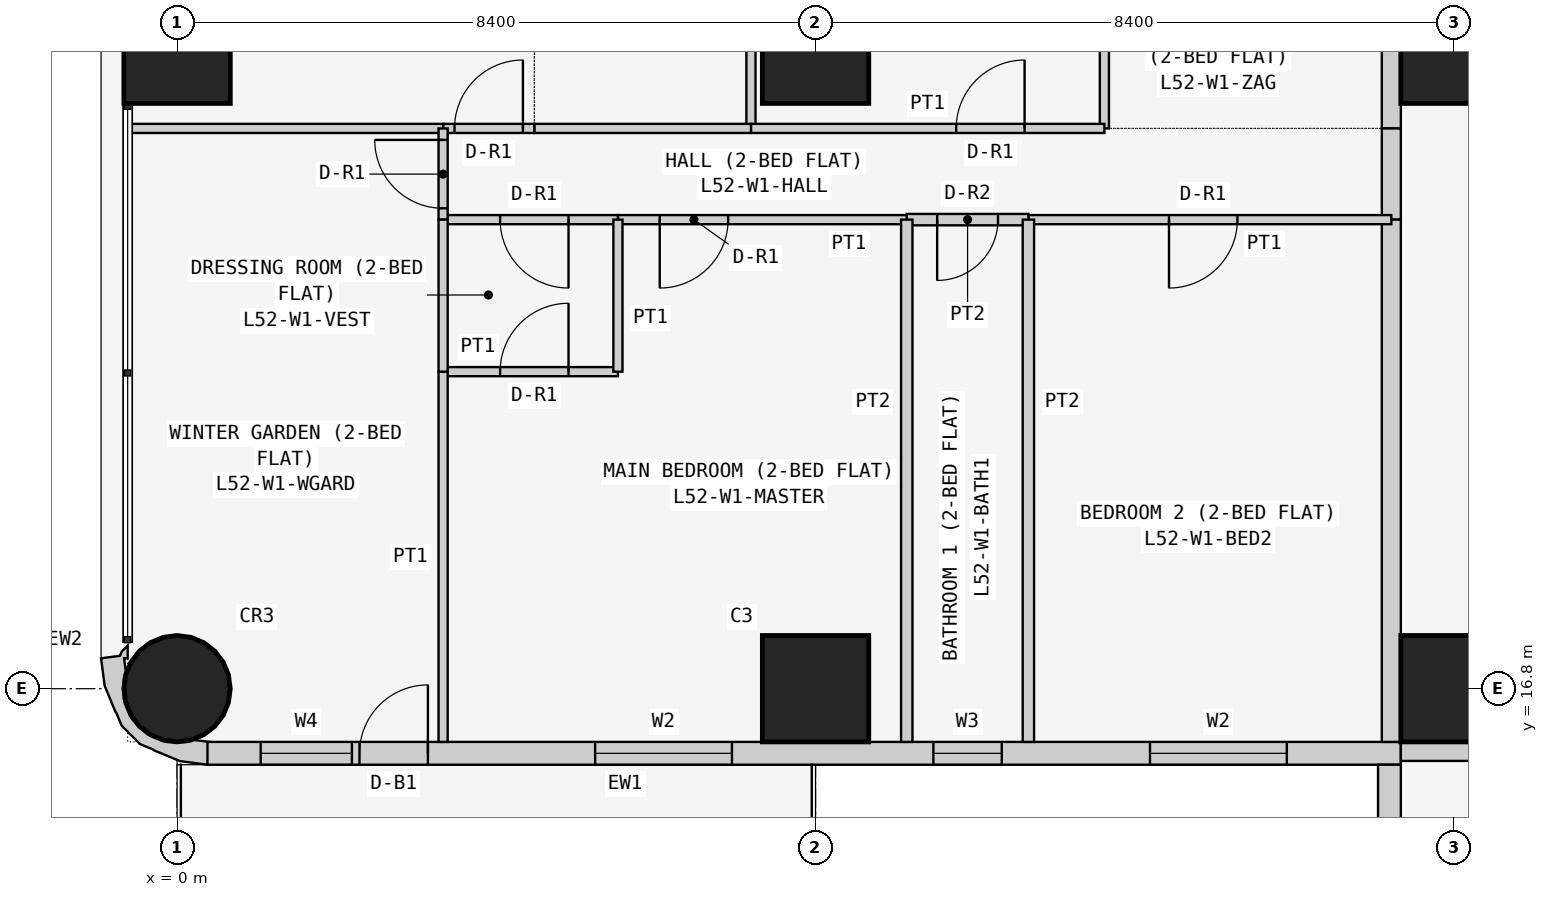
"""IFC4 building model, lengths in metres.
Left out: names, types, materials, properties, quantities, classifications, styles, units other than length and angle.
Written with IfcOpenShell. Run it as: python <this file> out.ifc"""

import sys

from ifc_helpers import new_model, si_unit, direction, frame, frame_2d, origin, origin_2d, place, context, subcontext, project, spatial, polyline, rectangle, circle, outline, extrude, element, fill, save


model = new_model("IFC4")
c1 = context("Model", 3, precision=1e-05, world=origin(), true_north=direction((0.0, 1.0)))
c2 = subcontext(c1, "Body", "Model", "MODEL_VIEW")
j1 = project(units=[si_unit("LENGTHUNIT", "METRE"), si_unit("PLANEANGLEUNIT", "RADIAN")], contexts=[c1])
p1 = place(None, origin())
s1 = spatial("IfcSite", under=j1, at=p1, CompositionType="ELEMENT")
p2 = place(p1, origin())
s2 = spatial("IfcBuilding", under=s1, at=p2, CompositionType="ELEMENT")
p3 = place(p2, frame((0.0, 0.0, 201.3)))
s3 = spatial("IfcBuildingStorey", under=s2, at=p3, CompositionType="ELEMENT", Elevation=201.3)
p4 = place(p3, frame((0.0, 16.8, 0.0), z_axis=(0.0, 0.0, 1.0), x_axis=(1.0, 0.0, 0.0)))
e1 = element("IfcColumn", 1, at=p4, inside=s3, PredefinedType="COLUMN", context=c2, shape_type="SweptSolid", body=[
    extrude(circle(Radius=0.7, at=origin_2d()), origin(), (0.0, 0.0, 1.0), 3.6),
])
for number, where, z_axis, x_axis in (
    (2, (0.0, 25.2, 0.0), (0.0, 0.0, 1.0), (1.0, 0.0, 0.0)),
    (3, (8.4, 16.8, 0.0), (0.0, 0.0, 1.0), (1.0, 0.0, 0.0)),
    (4, (8.4, 25.2, 0.0), (0.0, 0.0, 1.0), (1.0, 0.0, 0.0)),
    (5, (16.8, 16.8, 0.0), (0.0, 0.0, 1.0), (1.0, 0.0, 0.0)),
    (6, (16.8, 25.2, 0.0), (0.0, 0.0, 1.0), (1.0, 0.0, 0.0)),
):
    element("IfcColumn", number, at=place(p3, frame(where, z_axis=z_axis, x_axis=x_axis)), inside=s3, PredefinedType="COLUMN", context=c2, shape_type="SweptSolid", body=[
        extrude(rectangle(XDim=1.4, YDim=1.4, at=origin_2d()), origin(), (0.0, 0.0, 1.0), 3.6),
    ])
p5 = place(p3, frame((0.4, 15.95, 0.0), z_axis=(0.0, 0.0, 1.0), x_axis=(1.0, 0.0, 0.0)))
e7 = element("IfcWall", 7, at=p5, inside=s3, PredefinedType="SOLIDWALL", context=c2, shape_type="SweptSolid", body=[
    extrude(rectangle(XDim=15.7, YDim=0.3, at=frame_2d((7.85, 0.0))), origin(), (0.0, 0.0, 1.0), 3.45),
])
p6 = place(p5, frame((12.4, 0.0, 0.9)))
e8 = element("IfcOpeningElement", 8, at=p6, cuts=e7, PredefinedType="OPENING", context=c2, shape_type="SweptSolid", body=[
    extrude(rectangle(XDim=1.8, YDim=1.5, at=frame_2d((0.9, 0.75))), frame((0.0, 0.16, 0.0), z_axis=(0.0, -1.0, 0.0), x_axis=(1.0, 0.0, 0.0)), (0.0, 0.0, 1.0), 0.32),
])
p7 = place(p5, frame((9.55, 0.0, 1.5)))
e9 = element("IfcOpeningElement", 9, at=p7, cuts=e7, PredefinedType="OPENING", context=c2, shape_type="SweptSolid", body=[
    extrude(rectangle(XDim=0.9, YDim=0.7, at=frame_2d((0.45, 0.35))), frame((0.0, 0.16, 0.0), z_axis=(0.0, -1.0, 0.0), x_axis=(1.0, 0.0, 0.0)), (0.0, 0.0, 1.0), 0.32),
])
p8 = place(p5, frame((5.1, 0.0, 0.9)))
e10 = element("IfcOpeningElement", 10, at=p8, cuts=e7, PredefinedType="OPENING", context=c2, shape_type="SweptSolid", body=[
    extrude(rectangle(XDim=1.8, YDim=1.5, at=frame_2d((0.9, 0.75))), frame((0.0, 0.16, 0.0), z_axis=(0.0, -1.0, 0.0), x_axis=(1.0, 0.0, 0.0)), (0.0, 0.0, 1.0), 0.32),
])
p9 = place(p5, frame((2.0, 0.0, 0.0)))
e11 = element("IfcOpeningElement", 11, at=p9, cuts=e7, PredefinedType="OPENING", context=c2, shape_type="SweptSolid", body=[
    extrude(rectangle(XDim=0.9, YDim=2.4, at=frame_2d((0.45, 1.2))), frame((0.0, 0.16, 0.0), z_axis=(0.0, -1.0, 0.0), x_axis=(1.0, 0.0, 0.0)), (0.0, 0.0, 1.0), 0.32),
])
p10 = place(p5, frame((0.7, 0.0, 0.9)))
e12 = element("IfcOpeningElement", 12, at=p10, cuts=e7, PredefinedType="OPENING", context=c2, shape_type="SweptSolid", body=[
    extrude(rectangle(XDim=1.2, YDim=1.5, at=frame_2d((0.6, 0.75))), frame((0.0, 0.16, 0.0), z_axis=(0.0, -1.0, 0.0), x_axis=(1.0, 0.0, 0.0)), (0.0, 0.0, 1.0), 0.32),
])
p11 = place(p3, frame((15.95, 15.8, 0.0), z_axis=(0.0, 0.0, 1.0), x_axis=(0.0, -1.0, 0.0)))
e13 = element("IfcWall", 13, at=p11, inside=s3, PredefinedType="SOLIDWALL", context=c2, shape_type="SweptSolid", body=[
    extrude(rectangle(XDim=7.0, YDim=0.3, at=frame_2d((3.5, 0.0))), origin(), (0.0, 0.0, 1.0), 3.45),
])
p12 = place(p11, frame((1.5, 0.0, 0.9)))
e14 = element("IfcOpeningElement", 14, at=p12, cuts=e13, PredefinedType="OPENING", context=c2, shape_type="SweptSolid", body=[
    extrude(rectangle(XDim=2.4, YDim=1.5, at=frame_2d((1.2, 0.75))), frame((0.0, 0.16, 0.0), z_axis=(0.0, -1.0, 0.0), x_axis=(1.0, 0.0, 0.0)), (0.0, 0.0, 1.0), 0.32),
])
p13 = place(p11, frame((5.05, 0.0, 0.9)))
e15 = element("IfcOpeningElement", 15, at=p13, cuts=e13, PredefinedType="OPENING", context=c2, shape_type="SweptSolid", body=[
    extrude(rectangle(XDim=1.2, YDim=1.5, at=frame_2d((0.6, 0.75))), frame((0.0, 0.16, 0.0), z_axis=(0.0, -1.0, 0.0), x_axis=(1.0, 0.0, 0.0)), (0.0, 0.0, 1.0), 0.32),
])
p14 = place(p3, frame((-0.588, 17.312, 0.0), z_axis=(0.0, 0.0, 1.0), x_axis=(-0.898030234854, -0.439933741929, 0.0)))
e16 = element("IfcWall", 16, at=p14, inside=s3, PredefinedType="SOLIDWALL", context=c2, shape_type="SweptSolid", body=[
    extrude(outline(polyline([(-0.222, 1.793), (-0.39, 1.541), (-0.372, 1.532), (-0.195, 1.415), (-0.12, 1.41), (0.131, 1.287), (0.315, 1.078), (0.406, 0.814), (0.388, 0.536), (0.265, 0.285), (0.209, 0.236), (0.148, 0.053), (0.105, 0.074), (0.032, -0.076), (0.138, -0.039), (0.182, -0.0), (0.419, -0.08), (0.536, 0.266), (0.559, 0.631), (0.555, 0.651), (0.566, 0.836), (0.456, 1.159), (0.333, 1.298), (0.324, 1.316), (0.082, 1.591), (-0.222, 1.793)])), origin(), (0.0, 0.0, 1.0), 3.45),
])
p15 = place(p3, frame((22.971, 15.975, 0.0), z_axis=(0.0, 0.0, 1.0), x_axis=(-1.0, 0.0, 0.0)))
e17 = element("IfcWall", 17, at=p15, inside=s3, PredefinedType="PARTITIONING", context=c2, shape_type="SweptSolid", body=[
    extrude(rectangle(XDim=6.871, YDim=0.25, at=frame_2d((3.436, 0.0))), origin(), (0.0, 0.0, 1.0), 3.45),
])
p16 = place(p3, frame((15.975, 24.171, 0.0), z_axis=(0.0, 0.0, 1.0), x_axis=(0.0, 1.0, 0.0)))
e18 = element("IfcWall", 18, at=p16, inside=s3, PredefinedType="PARTITIONING", context=c2, shape_type="SweptSolid", body=[
    extrude(rectangle(XDim=5.229, YDim=0.25, at=frame_2d((2.615, 0.0))), origin(), (0.0, 0.0, 1.0), 3.45),
])
p17 = place(p16, frame((2.129, 0.0, 0.0)))
e19 = element("IfcOpeningElement", 19, at=p17, cuts=e18, PredefinedType="OPENING", context=c2, shape_type="SweptSolid", body=[
    extrude(rectangle(XDim=1.0, YDim=2.1, at=frame_2d((0.5, 1.05))), frame((0.0, 0.135, 0.0), z_axis=(0.0, -1.0, 0.0), x_axis=(1.0, 0.0, 0.0)), (0.0, 0.0, 1.0), 0.27),
])
p18 = place(p3, frame((15.975, 22.971, 0.0), z_axis=(0.0, 0.0, 1.0), x_axis=(0.0, 1.0, 0.0)))
e20 = element("IfcWall", 20, at=p18, inside=s3, PredefinedType="PARTITIONING", context=c2, shape_type="SweptSolid", body=[
    extrude(rectangle(XDim=1.2, YDim=0.25, at=frame_2d((0.6, 0.0))), origin(), (0.0, 0.0, 1.0), 3.45),
])
p19 = place(p3, frame((15.975, 16.1, 0.0), z_axis=(0.0, 0.0, 1.0), x_axis=(0.0, 1.0, 0.0)))
e21 = element("IfcWall", 21, at=p19, inside=s3, PredefinedType="PARTITIONING", context=c2, shape_type="SweptSolid", body=[
    extrude(rectangle(XDim=6.871, YDim=0.25, at=frame_2d((3.436, 0.0))), origin(), (0.0, 0.0, 1.0), 3.45),
])
for number, where, z_axis, x_axis in (
    (22, (12.2, 29.4, 0.0), (0.0, 0.0, 1.0), (0.0, -1.0, 0.0)),
    (23, (7.55, 29.4, 0.0), (0.0, 0.0, 1.0), (0.0, -1.0, 0.0)),
):
    element("IfcWall", number, at=place(p3, frame(where, z_axis=z_axis, x_axis=x_axis)), inside=s3, PredefinedType="PARTITIONING", context=c2, shape_type="SweptSolid", body=[
        extrude(rectangle(XDim=5.229, YDim=0.12, at=frame_2d((2.615, 0.0))), origin(), (0.0, 0.0, 1.0), 3.45),
    ])
p20 = place(p3, frame((7.55, 24.171, 0.0), z_axis=(0.0, 0.0, 1.0), x_axis=(1.0, 0.0, 0.0)))
e24 = element("IfcWall", 24, at=p20, inside=s3, PredefinedType="PARTITIONING", context=c2, shape_type="SweptSolid", body=[
    extrude(rectangle(XDim=4.65, YDim=0.12, at=frame_2d((2.325, 0.0))), origin(), (0.0, 0.0, 1.0), 3.45),
])
p21 = place(p20, frame((2.7, 0.0, 0.0)))
e25 = element("IfcOpeningElement", 25, at=p21, cuts=e24, PredefinedType="OPENING", context=c2, shape_type="SweptSolid", body=[
    extrude(rectangle(XDim=0.9, YDim=2.1, at=frame_2d((0.45, 1.05))), frame((0.0, 0.07, 0.0), z_axis=(0.0, -1.0, 0.0), x_axis=(1.0, 0.0, 0.0)), (0.0, 0.0, 1.0), 0.14),
])
p22 = place(p3, frame((4.7, 24.171, 0.0), z_axis=(0.0, 0.0, 1.0), x_axis=(1.0, 0.0, 0.0)))
e26 = element("IfcWall", 26, at=p22, inside=s3, PredefinedType="PARTITIONING", context=c2, shape_type="SweptSolid", body=[
    extrude(rectangle(XDim=2.85, YDim=0.12, at=frame_2d((1.425, 0.0))), origin(), (0.0, 0.0, 1.0), 3.45),
])
p23 = place(p3, frame((3.5, 24.171, 0.0), z_axis=(0.0, 0.0, 1.0), x_axis=(1.0, 0.0, 0.0)))
e27 = element("IfcWall", 27, at=p23, inside=s3, PredefinedType="PARTITIONING", context=c2, shape_type="SweptSolid", body=[
    extrude(rectangle(XDim=1.2, YDim=0.12, at=frame_2d((0.6, 0.0))), origin(), (0.0, 0.0, 1.0), 3.45),
])
p24 = place(p23, frame((0.15, 0.0, 0.0)))
e28 = element("IfcOpeningElement", 28, at=p24, cuts=e27, PredefinedType="OPENING", context=c2, shape_type="SweptSolid", body=[
    extrude(rectangle(XDim=0.9, YDim=2.1, at=frame_2d((0.45, 1.05))), frame((0.0, 0.07, 0.0), z_axis=(0.0, -1.0, 0.0), x_axis=(1.0, 0.0, 0.0)), (0.0, 0.0, 1.0), 0.14),
])
p25 = place(p3, frame((-0.65, 24.171, 0.0), z_axis=(0.0, 0.0, 1.0), x_axis=(1.0, 0.0, 0.0)))
e29 = element("IfcWall", 29, at=p25, inside=s3, PredefinedType="PARTITIONING", context=c2, shape_type="SweptSolid", body=[
    extrude(rectangle(XDim=4.15, YDim=0.12, at=frame_2d((2.075, 0.0))), origin(), (0.0, 0.0, 1.0), 3.45),
])
p26 = place(p3, frame((11.2, 22.971, 0.0), z_axis=(0.0, 0.0, 1.0), x_axis=(1.0, 0.0, 0.0)))
e30 = element("IfcWall", 30, at=p26, inside=s3, PredefinedType="PARTITIONING", context=c2, shape_type="SweptSolid", body=[
    extrude(rectangle(XDim=4.775, YDim=0.12, at=frame_2d((2.388, 0.0))), origin(), (0.0, 0.0, 1.0), 3.45),
])
p27 = place(p26, frame((1.85, 0.0, 0.0)))
e31 = element("IfcOpeningElement", 31, at=p27, cuts=e30, PredefinedType="OPENING", context=c2, shape_type="SweptSolid", body=[
    extrude(rectangle(XDim=0.9, YDim=2.1, at=frame_2d((0.45, 1.05))), frame((0.0, 0.07, 0.0), z_axis=(0.0, -1.0, 0.0), x_axis=(1.0, 0.0, 0.0)), (0.0, 0.0, 1.0), 0.14),
])
p28 = place(p3, frame((9.6, 22.971, 0.0), z_axis=(0.0, 0.0, 1.0), x_axis=(1.0, 0.0, 0.0)))
e32 = element("IfcWall", 32, at=p28, inside=s3, PredefinedType="PARTITIONING", context=c2, shape_type="SweptSolid", body=[
    extrude(rectangle(XDim=1.6, YDim=0.15, at=frame_2d((0.8, 0.0))), origin(), (0.0, 0.0, 1.0), 3.45),
])
p29 = place(p28, frame((0.4, 0.0, 0.0)))
e33 = element("IfcOpeningElement", 33, at=p29, cuts=e32, PredefinedType="OPENING", context=c2, shape_type="SweptSolid", body=[
    extrude(rectangle(XDim=0.8, YDim=2.1, at=frame_2d((0.4, 1.05))), frame((0.0, 0.085, 0.0), z_axis=(0.0, -1.0, 0.0), x_axis=(1.0, 0.0, 0.0)), (0.0, 0.0, 1.0), 0.17),
])
p30 = place(p3, frame((5.8, 22.971, 0.0), z_axis=(0.0, 0.0, 1.0), x_axis=(1.0, 0.0, 0.0)))
e34 = element("IfcWall", 34, at=p30, inside=s3, PredefinedType="PARTITIONING", context=c2, shape_type="SweptSolid", body=[
    extrude(rectangle(XDim=3.8, YDim=0.12, at=frame_2d((1.9, 0.0))), origin(), (0.0, 0.0, 1.0), 3.45),
])
p31 = place(p30, frame((0.55, 0.0, 0.0)))
e35 = element("IfcOpeningElement", 35, at=p31, cuts=e34, PredefinedType="OPENING", context=c2, shape_type="SweptSolid", body=[
    extrude(rectangle(XDim=0.9, YDim=2.1, at=frame_2d((0.45, 1.05))), frame((0.0, 0.07, 0.0), z_axis=(0.0, -1.0, 0.0), x_axis=(1.0, 0.0, 0.0)), (0.0, 0.0, 1.0), 0.14),
])
p32 = place(p3, frame((3.5, 22.971, 0.0), z_axis=(0.0, 0.0, 1.0), x_axis=(1.0, 0.0, 0.0)))
e36 = element("IfcWall", 36, at=p32, inside=s3, PredefinedType="PARTITIONING", context=c2, shape_type="SweptSolid", body=[
    extrude(rectangle(XDim=2.3, YDim=0.12, at=frame_2d((1.15, 0.0))), origin(), (0.0, 0.0, 1.0), 3.45),
])
p33 = place(p32, frame((0.75, 0.0, 0.0)))
e37 = element("IfcOpeningElement", 37, at=p33, cuts=e36, PredefinedType="OPENING", context=c2, shape_type="SweptSolid", body=[
    extrude(rectangle(XDim=0.9, YDim=2.1, at=frame_2d((0.45, 1.05))), frame((0.0, 0.07, 0.0), z_axis=(0.0, -1.0, 0.0), x_axis=(1.0, 0.0, 0.0)), (0.0, 0.0, 1.0), 0.14),
])
p34 = place(p3, frame((3.5, 24.171, 0.0), z_axis=(0.0, 0.0, 1.0), x_axis=(0.0, -1.0, 0.0)))
e38 = element("IfcWall", 38, at=p34, inside=s3, PredefinedType="PARTITIONING", context=c2, shape_type="SweptSolid", body=[
    extrude(rectangle(XDim=1.2, YDim=0.12, at=frame_2d((0.6, 0.0))), origin(), (0.0, 0.0, 1.0), 3.45),
])
p35 = place(p34, frame((0.151, 0.0, 0.0)))
e39 = element("IfcOpeningElement", 39, at=p35, cuts=e38, PredefinedType="OPENING", context=c2, shape_type="SweptSolid", body=[
    extrude(rectangle(XDim=0.9, YDim=2.1, at=frame_2d((0.45, 1.05))), frame((0.0, 0.07, 0.0), z_axis=(0.0, -1.0, 0.0), x_axis=(1.0, 0.0, 0.0)), (0.0, 0.0, 1.0), 0.14),
])
for number, where, z_axis, x_axis in (
    (40, (11.2, 22.971, 0.0), (0.0, 0.0, 1.0), (0.0, -1.0, 0.0)),
    (41, (9.6, 22.971, 0.0), (0.0, 0.0, 1.0), (0.0, -1.0, 0.0)),
):
    element("IfcWall", number, at=place(p3, frame(where, z_axis=z_axis, x_axis=x_axis)), inside=s3, PredefinedType="PARTITIONING", context=c2, shape_type="SweptSolid", body=[
        extrude(rectangle(XDim=6.871, YDim=0.15, at=frame_2d((3.436, 0.0))), origin(), (0.0, 0.0, 1.0), 3.45),
    ])
p36 = place(p3, frame((3.5, 20.971, 0.0), z_axis=(0.0, 0.0, 1.0), x_axis=(1.0, 0.0, 0.0)))
e42 = element("IfcWall", 42, at=p36, inside=s3, PredefinedType="PARTITIONING", context=c2, shape_type="SweptSolid", body=[
    extrude(rectangle(XDim=2.3, YDim=0.12, at=frame_2d((1.15, 0.0))), origin(), (0.0, 0.0, 1.0), 3.45),
])
p37 = place(p36, frame((0.75, 0.0, 0.0)))
e43 = element("IfcOpeningElement", 43, at=p37, cuts=e42, PredefinedType="OPENING", context=c2, shape_type="SweptSolid", body=[
    extrude(rectangle(XDim=0.9, YDim=2.1, at=frame_2d((0.45, 1.05))), frame((0.0, 0.07, 0.0), z_axis=(0.0, -1.0, 0.0), x_axis=(1.0, 0.0, 0.0)), (0.0, 0.0, 1.0), 0.14),
])
p38 = place(p3, frame((5.8, 20.971, 0.0), z_axis=(0.0, 0.0, 1.0), x_axis=(0.0, 1.0, 0.0)))
e44 = element("IfcWall", 44, at=p38, inside=s3, PredefinedType="PARTITIONING", context=c2, shape_type="SweptSolid", body=[
    extrude(rectangle(XDim=2.0, YDim=0.12, at=frame_2d((1.0, 0.0))), origin(), (0.0, 0.0, 1.0), 3.45),
])
p39 = place(p3, frame((3.5, 16.1, 0.0), z_axis=(0.0, 0.0, 1.0), x_axis=(0.0, 1.0, 0.0)))
e45 = element("IfcWall", 45, at=p39, inside=s3, PredefinedType="PARTITIONING", context=c2, shape_type="SweptSolid", body=[
    extrude(rectangle(XDim=4.871, YDim=0.12, at=frame_2d((2.436, 0.0))), origin(), (0.0, 0.0, 1.0), 3.45),
])
p40 = place(p3, frame((3.5, 22.971, 0.0), z_axis=(0.0, 0.0, 1.0), x_axis=(0.0, -1.0, 0.0)))
e46 = element("IfcWall", 46, at=p40, inside=s3, PredefinedType="PARTITIONING", context=c2, shape_type="SweptSolid", body=[
    extrude(rectangle(XDim=2.0, YDim=0.12, at=frame_2d((1.0, 0.0))), origin(), (0.0, 0.0, 1.0), 3.45),
])
p41 = place(p6, origin())
e47 = element("IfcWindow", 47, at=p41, inside=s3, PartitioningType="SINGLE_PANEL", PredefinedType="WINDOW", context=c2, shape_type="SweptSolid", body=[
    extrude(rectangle(XDim=1.8, YDim=1.5, at=frame_2d((0.9, 0.75))), frame((0.0, 0.03, 0.0), z_axis=(0.0, -1.0, 0.0), x_axis=(1.0, 0.0, 0.0)), (0.0, 0.0, 1.0), 0.06),
])
fill(e8, e47)
p42 = place(p7, origin())
e48 = element("IfcWindow", 48, at=p42, inside=s3, PartitioningType="SINGLE_PANEL", PredefinedType="WINDOW", context=c2, shape_type="SweptSolid", body=[
    extrude(rectangle(XDim=0.9, YDim=0.7, at=frame_2d((0.45, 0.35))), frame((0.0, 0.03, 0.0), z_axis=(0.0, -1.0, 0.0), x_axis=(1.0, 0.0, 0.0)), (0.0, 0.0, 1.0), 0.06),
])
fill(e9, e48)
p43 = place(p8, origin())
e49 = element("IfcWindow", 49, at=p43, inside=s3, PartitioningType="SINGLE_PANEL", PredefinedType="WINDOW", context=c2, shape_type="SweptSolid", body=[
    extrude(rectangle(XDim=1.8, YDim=1.5, at=frame_2d((0.9, 0.75))), frame((0.0, 0.03, 0.0), z_axis=(0.0, -1.0, 0.0), x_axis=(1.0, 0.0, 0.0)), (0.0, 0.0, 1.0), 0.06),
])
fill(e10, e49)
p44 = place(p9, origin())
e50 = element("IfcDoor", 50, at=p44, inside=s3, OperationType="SINGLE_SWING_RIGHT", PredefinedType="DOOR", context=c2, shape_type="SweptSolid", body=[
    extrude(rectangle(XDim=0.9, YDim=2.4, at=frame_2d((0.45, 1.2))), frame((0.0, 0.025, 0.0), z_axis=(0.0, -1.0, 0.0), x_axis=(1.0, 0.0, 0.0)), (0.0, 0.0, 1.0), 0.05),
])
fill(e11, e50)
p45 = place(p10, origin())
e51 = element("IfcWindow", 51, at=p45, inside=s3, PartitioningType="SINGLE_PANEL", PredefinedType="WINDOW", context=c2, shape_type="SweptSolid", body=[
    extrude(rectangle(XDim=1.2, YDim=1.5, at=frame_2d((0.6, 0.75))), frame((0.0, 0.03, 0.0), z_axis=(0.0, -1.0, 0.0), x_axis=(1.0, 0.0, 0.0)), (0.0, 0.0, 1.0), 0.06),
])
fill(e12, e51)
p46 = place(p21, origin())
e52 = element("IfcDoor", 52, at=p46, inside=s3, OperationType="SINGLE_SWING_RIGHT", PredefinedType="DOOR", context=c2, shape_type="SweptSolid", body=[
    extrude(rectangle(XDim=0.9, YDim=2.1, at=frame_2d((0.45, 1.05))), frame((0.0, 0.025, 0.0), z_axis=(0.0, -1.0, 0.0), x_axis=(1.0, 0.0, 0.0)), (0.0, 0.0, 1.0), 0.05),
])
fill(e25, e52)
p47 = place(p24, origin())
e53 = element("IfcDoor", 53, at=p47, inside=s3, OperationType="SINGLE_SWING_RIGHT", PredefinedType="DOOR", context=c2, shape_type="SweptSolid", body=[
    extrude(rectangle(XDim=0.9, YDim=2.1, at=frame_2d((0.45, 1.05))), frame((0.0, 0.025, 0.0), z_axis=(0.0, -1.0, 0.0), x_axis=(1.0, 0.0, 0.0)), (0.0, 0.0, 1.0), 0.05),
])
fill(e28, e53)
p48 = place(p27, frame((0.9, 0.0, 0.0), z_axis=(0.0, 0.0, 1.0), x_axis=(-1.0, 0.0, 0.0)))
e54 = element("IfcDoor", 54, at=p48, inside=s3, OperationType="SINGLE_SWING_RIGHT", PredefinedType="DOOR", context=c2, shape_type="SweptSolid", body=[
    extrude(rectangle(XDim=0.9, YDim=2.1, at=frame_2d((0.45, 1.05))), frame((0.0, 0.025, 0.0), z_axis=(0.0, -1.0, 0.0), x_axis=(1.0, 0.0, 0.0)), (0.0, 0.0, 1.0), 0.05),
])
fill(e31, e54)
p49 = place(p29, frame((0.8, 0.0, 0.0), z_axis=(0.0, 0.0, 1.0), x_axis=(-1.0, 0.0, 0.0)))
e55 = element("IfcDoor", 55, at=p49, inside=s3, OperationType="SINGLE_SWING_RIGHT", PredefinedType="DOOR", context=c2, shape_type="SweptSolid", body=[
    extrude(rectangle(XDim=0.8, YDim=2.1, at=frame_2d((0.4, 1.05))), frame((0.0, 0.025, 0.0), z_axis=(0.0, -1.0, 0.0), x_axis=(1.0, 0.0, 0.0)), (0.0, 0.0, 1.0), 0.05),
])
fill(e33, e55)
p50 = place(p31, frame((0.9, 0.0, 0.0), z_axis=(0.0, 0.0, 1.0), x_axis=(-1.0, 0.0, 0.0)))
e56 = element("IfcDoor", 56, at=p50, inside=s3, OperationType="SINGLE_SWING_RIGHT", PredefinedType="DOOR", context=c2, shape_type="SweptSolid", body=[
    extrude(rectangle(XDim=0.9, YDim=2.1, at=frame_2d((0.45, 1.05))), frame((0.0, 0.025, 0.0), z_axis=(0.0, -1.0, 0.0), x_axis=(1.0, 0.0, 0.0)), (0.0, 0.0, 1.0), 0.05),
])
fill(e35, e56)
p51 = place(p33, frame((0.9, 0.0, 0.0), z_axis=(0.0, 0.0, 1.0), x_axis=(-1.0, 0.0, 0.0)))
e57 = element("IfcDoor", 57, at=p51, inside=s3, OperationType="SINGLE_SWING_LEFT", PredefinedType="DOOR", context=c2, shape_type="SweptSolid", body=[
    extrude(rectangle(XDim=0.9, YDim=2.1, at=frame_2d((0.45, 1.05))), frame((0.0, 0.025, 0.0), z_axis=(0.0, -1.0, 0.0), x_axis=(1.0, 0.0, 0.0)), (0.0, 0.0, 1.0), 0.05),
])
fill(e37, e57)
p52 = place(p37, origin())
e58 = element("IfcDoor", 58, at=p52, inside=s3, OperationType="SINGLE_SWING_RIGHT", PredefinedType="DOOR", context=c2, shape_type="SweptSolid", body=[
    extrude(rectangle(XDim=0.9, YDim=2.1, at=frame_2d((0.45, 1.05))), frame((0.0, 0.025, 0.0), z_axis=(0.0, -1.0, 0.0), x_axis=(1.0, 0.0, 0.0)), (0.0, 0.0, 1.0), 0.05),
])
fill(e43, e58)
p53 = place(p35, frame((0.9, 0.0, 0.0), z_axis=(0.0, 0.0, 1.0), x_axis=(-1.0, 0.0, 0.0)))
e59 = element("IfcDoor", 59, at=p53, inside=s3, OperationType="SINGLE_SWING_RIGHT", PredefinedType="DOOR", context=c2, shape_type="SweptSolid", body=[
    extrude(rectangle(XDim=0.9, YDim=2.1, at=frame_2d((0.45, 1.05))), frame((0.0, 0.025, 0.0), z_axis=(0.0, -1.0, 0.0), x_axis=(1.0, 0.0, 0.0)), (0.0, 0.0, 1.0), 0.05),
])
fill(e39, e59)
save(model, sys.argv[1])
